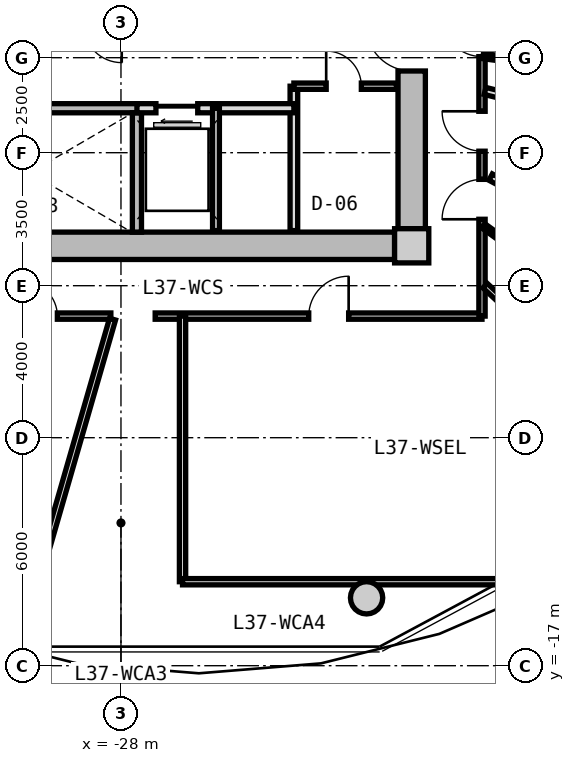
"""IFC4 building model, lengths in metres.
Left out: names, types, materials, properties, quantities, classifications, styles, units other than length and angle.
Written with IfcOpenShell. Run it as: python <this file> out.ifc"""

import sys

from ifc_helpers import new_model, si_unit, direction, frame, frame_2d, origin, origin_2d, place, context, subcontext, project, spatial, rectangle, circle, extrude, source, transform, mapped, element, fill, save


model = new_model("IFC4")
c1 = context("Model", 3, precision=1e-05, world=origin(), true_north=direction((0.0, 1.0)))
c2 = subcontext(c1, "Body", "Model", "MODEL_VIEW")
j1 = project(units=[si_unit("LENGTHUNIT", "METRE"), si_unit("PLANEANGLEUNIT", "RADIAN")], contexts=[c1])
p1 = place(None, origin())
s1 = spatial("IfcSite", under=j1, at=p1, CompositionType="ELEMENT")
p2 = place(p1, origin())
s2 = spatial("IfcBuilding", under=s1, at=p2, CompositionType="ELEMENT")
p3 = place(p2, frame((0.0, 0.0, 120.65)))
s3 = spatial("IfcBuildingStorey", under=s2, at=p3, CompositionType="ELEMENT", Elevation=120.65)
m1 = source(origin(), c2, "Body", "SweptSolid", [
    extrude(rectangle(XDim=0.9, YDim=0.9, at=origin_2d()), origin(), (0.0, 0.0, 1.0), 3.05),
])
p4 = place(p3, frame((-20.35, -5.95, 0.0), z_axis=(0.0, 0.0, 1.0), x_axis=(1.0, 0.0, 0.0)))
e1 = element("IfcColumn", 1, at=p4, inside=s3, PredefinedType="COLUMN", context=c2, shape_type="MappedRepresentation", body=[
    mapped(m1, transform((0.0, 0.0, 0.0), x_axis=(1.0, 0.0, 0.0), y_axis=(0.0, 1.0, 0.0), z_axis=(0.0, 0.0, 1.0), scale=1.0)),
])
m2 = source(origin(), c2, "Body", "SweptSolid", [
    extrude(rectangle(XDim=14.4, YDim=0.72, at=frame_2d((7.2, 0.0))), origin(), (0.0, 0.0, 1.0), 2.79),
])
p5 = place(p3, frame((-20.8, -5.95, 0.0), z_axis=(0.0, 0.0, 1.0), x_axis=(-1.0, 0.0, 0.0)))
e2 = element("IfcWall", 2, at=p5, inside=s3, PredefinedType="SHEAR", context=c2, shape_type="MappedRepresentation", body=[
    mapped(m2, transform((0.0, 0.0, 0.0), x_axis=(1.0, 0.0, 0.0), y_axis=(0.0, 1.0, 0.0), z_axis=(0.0, 0.0, 1.0), scale=1.0)),
])
m3 = source(origin(), c2, "Body", "SweptSolid", [
    extrude(rectangle(XDim=11.0, YDim=0.72, at=frame_2d((5.5, 0.0))), origin(), (0.0, 0.0, 1.0), 2.79),
])
p6 = place(p3, frame((-20.35, 5.5, 0.0), z_axis=(0.0, 0.0, 1.0), x_axis=(0.0, -1.0, 0.0)))
e3 = element("IfcWall", 3, at=p6, inside=s3, PredefinedType="SHEAR", context=c2, shape_type="MappedRepresentation", body=[
    mapped(m3, transform((0.0, 0.0, 0.0), x_axis=(1.0, 0.0, 0.0), y_axis=(0.0, 1.0, 0.0), z_axis=(0.0, 0.0, 1.0), scale=1.0)),
])
p7 = place(p6, frame((5.65, 0.0, 0.0)))
e4 = element("IfcOpeningElement", 4, at=p7, cuts=e3, PredefinedType="OPENING", context=c2, shape_type="SweptSolid", body=[
    extrude(rectangle(XDim=1.2, YDim=2.15, at=frame_2d((0.6, 1.075))), frame((0.0, 0.37, 0.0), z_axis=(0.0, -1.0, 0.0), x_axis=(1.0, 0.0, 0.0)), (0.0, 0.0, 1.0), 0.74),
])
m4 = source(origin(), c2, "Body", "SweptSolid", [
    extrude(circle(Radius=0.425, at=origin_2d()), origin(), (0.0, 0.0, 1.0), 3.05),
])
p8 = place(p3, frame((-21.537, -15.213, 0.0), z_axis=(0.0, 0.0, 1.0), x_axis=(1.0, 0.0, 0.0)))
e5 = element("IfcColumn", 5, at=p8, inside=s3, PredefinedType="COLUMN", context=c2, shape_type="MappedRepresentation", body=[
    mapped(m4, transform((0.0, 0.0, 0.0), x_axis=(1.0, 0.0, 0.0), y_axis=(0.0, 1.0, 0.0), z_axis=(0.0, 0.0, 1.0), scale=1.0)),
])
m5 = source(origin(), c2, "Body", "SweptSolid", [
    extrude(rectangle(XDim=7.83, YDim=0.24, at=frame_2d((3.915, 0.0))), origin(), (0.0, 0.0, 1.0), 2.79),
])
p9 = place(p3, frame((-35.29, -2.33, 0.0), z_axis=(0.0, 0.0, 1.0), x_axis=(1.0, 0.0, 0.0)))
e6 = element("IfcWall", 6, at=p9, inside=s3, PredefinedType="PARTITIONING", context=c2, shape_type="MappedRepresentation", body=[
    mapped(m5, transform((0.0, 0.0, 0.0), x_axis=(1.0, 0.0, 0.0), y_axis=(0.0, 1.0, 0.0), z_axis=(0.0, 0.0, 1.0), scale=1.0)),
])
p10 = place(p9, frame((0.95, 0.0, 0.0)))
e7 = element("IfcOpeningElement", 7, at=p10, cuts=e6, PredefinedType="OPENING", context=c2, shape_type="SweptSolid", body=[
    extrude(rectangle(XDim=1.1, YDim=2.15, at=frame_2d((0.55, 1.075))), frame((0.0, 0.13, 0.0), z_axis=(0.0, -1.0, 0.0), x_axis=(1.0, 0.0, 0.0)), (0.0, 0.0, 1.0), 0.26),
])
m6 = source(origin(), c2, "Body", "SweptSolid", [
    extrude(rectangle(XDim=3.14, YDim=0.24, at=frame_2d((1.57, 0.0))), origin(), (0.0, 0.0, 1.0), 2.79),
])
p11 = place(p3, frame((-27.58, -5.59, 0.0), z_axis=(0.0, 0.0, 1.0), x_axis=(0.0, 1.0, 0.0)))
e8 = element("IfcWall", 8, at=p11, inside=s3, PredefinedType="PARTITIONING", context=c2, shape_type="MappedRepresentation", body=[
    mapped(m6, transform((0.0, 0.0, 0.0), x_axis=(1.0, 0.0, 0.0), y_axis=(0.0, 1.0, 0.0), z_axis=(0.0, 0.0, 1.0), scale=1.0)),
])
m7 = source(origin(), c2, "Body", "SweptSolid", [
    extrude(rectangle(XDim=3.8, YDim=0.2, at=frame_2d((1.9, 0.0))), origin(), (0.0, 0.0, 1.0), 2.775),
])
p12 = place(p3, frame((-23.45, -5.55, 0.0), z_axis=(0.0, 0.0, 1.0), x_axis=(0.0, 1.0, 0.0)))
e9 = element("IfcWall", 9, at=p12, inside=s3, PredefinedType="PARTITIONING", context=c2, shape_type="MappedRepresentation", body=[
    mapped(m7, transform((0.0, 0.0, 0.0), x_axis=(1.0, 0.0, 0.0), y_axis=(0.0, 1.0, 0.0), z_axis=(0.0, 0.0, 1.0), scale=1.0)),
])
m8 = source(origin(), c2, "Body", "SweptSolid", [
    extrude(rectangle(XDim=4.13, YDim=0.24, at=frame_2d((2.065, 0.0))), origin(), (0.0, 0.0, 1.0), 2.775),
])
p13 = place(p3, frame((-27.58, -2.33, 0.0), z_axis=(0.0, 0.0, 1.0), x_axis=(1.0, 0.0, 0.0)))
e10 = element("IfcWall", 10, at=p13, inside=s3, PredefinedType="PARTITIONING", context=c2, shape_type="MappedRepresentation", body=[
    mapped(m8, transform((0.0, 0.0, 0.0), x_axis=(1.0, 0.0, 0.0), y_axis=(0.0, 1.0, 0.0), z_axis=(0.0, 0.0, 1.0), scale=1.0)),
])
p14 = place(p13, frame((0.5, 0.0, 0.0)))
e11 = element("IfcOpeningElement", 11, at=p14, cuts=e10, PredefinedType="OPENING", context=c2, shape_type="SweptSolid", body=[
    extrude(rectangle(XDim=1.1, YDim=2.2, at=frame_2d((0.55, 1.1))), frame((0.0, 0.13, 0.0), z_axis=(0.0, -1.0, 0.0), x_axis=(1.0, 0.0, 0.0)), (0.0, 0.0, 1.0), 0.26),
])
m9 = source(origin(), c2, "Body", "SweptSolid", [
    extrude(rectangle(XDim=3.22, YDim=0.18, at=frame_2d((1.61, 0.0))), origin(), (0.0, 0.0, 1.0), 2.775),
])
p15 = place(p3, frame((-25.5, -5.55, 0.0), z_axis=(0.0, 0.0, 1.0), x_axis=(0.0, 1.0, 0.0)))
e12 = element("IfcWall", 12, at=p15, inside=s3, PredefinedType="PARTITIONING", context=c2, shape_type="MappedRepresentation", body=[
    mapped(m9, transform((0.0, 0.0, 0.0), x_axis=(1.0, 0.0, 0.0), y_axis=(0.0, 1.0, 0.0), z_axis=(0.0, 0.0, 1.0), scale=1.0)),
])
m10 = source(origin(), c2, "Body", "SweptSolid", [
    extrude(rectangle(XDim=2.7, YDim=0.165, at=frame_2d((1.35, 0.0))), origin(), (0.0, 0.0, 1.0), 2.775),
])
p16 = place(p3, frame((-23.45, -1.75, 0.0), z_axis=(0.0, 0.0, 1.0), x_axis=(1.0, 0.0, 0.0)))
e13 = element("IfcWall", 13, at=p16, inside=s3, PredefinedType="PARTITIONING", context=c2, shape_type="MappedRepresentation", body=[
    mapped(m10, transform((0.0, 0.0, 0.0), x_axis=(1.0, 0.0, 0.0), y_axis=(0.0, 1.0, 0.0), z_axis=(0.0, 0.0, 1.0), scale=1.0)),
])
p17 = place(p16, frame((0.85, 0.0, 0.0)))
e14 = element("IfcOpeningElement", 14, at=p17, cuts=e13, PredefinedType="OPENING", context=c2, shape_type="SweptSolid", body=[
    extrude(rectangle(XDim=0.925, YDim=2.1, at=frame_2d((0.462, 1.05))), frame((0.0, 0.093, 0.0), z_axis=(0.0, -1.0, 0.0), x_axis=(1.0, 0.0, 0.0)), (0.0, 0.0, 1.0), 0.185),
])
m11 = source(origin(), c2, "Body", "SweptSolid", [
    extrude(rectangle(XDim=8.6, YDim=0.165, at=frame_2d((4.3, 0.0))), origin(), (0.0, 0.0, 1.0), 2.775),
])
p18 = place(p3, frame((-18.5, -7.8, 0.0), z_axis=(0.0, 0.0, 1.0), x_axis=(-1.0, 0.0, 0.0)))
e15 = element("IfcWall", 15, at=p18, inside=s3, PredefinedType="PARTITIONING", context=c2, shape_type="MappedRepresentation", body=[
    mapped(m11, transform((0.0, 0.0, 0.0), x_axis=(1.0, 0.0, 0.0), y_axis=(0.0, 1.0, 0.0), z_axis=(0.0, 0.0, 1.0), scale=1.0)),
])
p19 = place(p18, frame((3.509, 0.0, 0.0)))
e16 = element("IfcOpeningElement", 16, at=p19, cuts=e15, PredefinedType="OPENING", context=c2, shape_type="SweptSolid", body=[
    extrude(rectangle(XDim=1.05, YDim=2.15, at=frame_2d((0.525, 1.075))), frame((0.0, 0.093, 0.0), z_axis=(0.0, -1.0, 0.0), x_axis=(1.0, 0.0, 0.0)), (0.0, 0.0, 1.0), 0.185),
])
m12 = source(origin(), c2, "Body", "SweptSolid", [
    extrude(rectangle(XDim=9.234, YDim=0.165, at=frame_2d((4.617, 0.0))), origin(), (0.0, 0.0, 1.0), 2.775),
])
p20 = place(p3, frame((-28.266, -7.8, 0.0), z_axis=(0.0, 0.0, 1.0), x_axis=(-1.0, 0.0, 0.0)))
e17 = element("IfcWall", 17, at=p20, inside=s3, PredefinedType="PARTITIONING", context=c2, shape_type="MappedRepresentation", body=[
    mapped(m12, transform((0.0, 0.0, 0.0), x_axis=(1.0, 0.0, 0.0), y_axis=(0.0, 1.0, 0.0), z_axis=(0.0, 0.0, 1.0), scale=1.0)),
])
p21 = place(p20, frame((7.009, 0.0, 0.0)))
e18 = element("IfcOpeningElement", 18, at=p21, cuts=e17, PredefinedType="OPENING", context=c2, shape_type="SweptSolid", body=[
    extrude(rectangle(XDim=1.05, YDim=2.15, at=frame_2d((0.525, 1.075))), frame((0.0, 0.093, 0.0), z_axis=(0.0, -1.0, 0.0), x_axis=(1.0, 0.0, 0.0)), (0.0, 0.0, 1.0), 0.185),
])
p22 = place(p20, frame((4.392, 0.0, 0.0)))
e19 = element("IfcOpeningElement", 19, at=p22, cuts=e17, PredefinedType="OPENING", context=c2, shape_type="SweptSolid", body=[
    extrude(rectangle(XDim=0.92, YDim=2.1, at=frame_2d((0.46, 1.05))), frame((0.0, 0.093, 0.0), z_axis=(0.0, -1.0, 0.0), x_axis=(1.0, 0.0, 0.0)), (0.0, 0.0, 1.0), 0.185),
])
p23 = place(p20, frame((1.408, 0.0, 0.0)))
e20 = element("IfcOpeningElement", 20, at=p23, cuts=e17, PredefinedType="OPENING", context=c2, shape_type="SweptSolid", body=[
    extrude(rectangle(XDim=0.92, YDim=2.1, at=frame_2d((0.46, 1.05))), frame((0.0, 0.093, 0.0), z_axis=(0.0, -1.0, 0.0), x_axis=(1.0, 0.0, 0.0)), (0.0, 0.0, 1.0), 0.185),
])
m13 = source(origin(), c2, "Body", "SweptSolid", [
    extrude(rectangle(XDim=15.6, YDim=0.165, at=frame_2d((7.8, 0.0))), origin(), (0.0, 0.0, 1.0), 2.775),
])
p24 = place(p3, frame((-18.5, 7.8, 0.0), z_axis=(0.0, 0.0, 1.0), x_axis=(0.0, -1.0, 0.0)))
e21 = element("IfcWall", 21, at=p24, inside=s3, PredefinedType="PARTITIONING", context=c2, shape_type="MappedRepresentation", body=[
    mapped(m13, transform((0.0, 0.0, 0.0), x_axis=(1.0, 0.0, 0.0), y_axis=(0.0, 1.0, 0.0), z_axis=(0.0, 0.0, 1.0), scale=1.0)),
])
p25 = place(p24, frame((12.002, 0.0, 0.0)))
e22 = element("IfcOpeningElement", 22, at=p25, cuts=e21, PredefinedType="OPENING", context=c2, shape_type="SweptSolid", body=[
    extrude(rectangle(XDim=1.05, YDim=2.15, at=frame_2d((0.525, 1.075))), frame((0.0, 0.093, 0.0), z_axis=(0.0, -1.0, 0.0), x_axis=(1.0, 0.0, 0.0)), (0.0, 0.0, 1.0), 0.185),
])
p26 = place(p24, frame((10.211, 0.0, 0.0)))
e23 = element("IfcOpeningElement", 23, at=p26, cuts=e21, PredefinedType="OPENING", context=c2, shape_type="SweptSolid", body=[
    extrude(rectangle(XDim=1.05, YDim=2.15, at=frame_2d((0.525, 1.075))), frame((0.0, 0.093, 0.0), z_axis=(0.0, -1.0, 0.0), x_axis=(1.0, 0.0, 0.0)), (0.0, 0.0, 1.0), 0.185),
])
p27 = place(p24, frame((7.722, 0.0, 0.0)))
e24 = element("IfcOpeningElement", 24, at=p27, cuts=e21, PredefinedType="OPENING", context=c2, shape_type="SweptSolid", body=[
    extrude(rectangle(XDim=1.05, YDim=2.15, at=frame_2d((0.525, 1.075))), frame((0.0, 0.093, 0.0), z_axis=(0.0, -1.0, 0.0), x_axis=(1.0, 0.0, 0.0)), (0.0, 0.0, 1.0), 0.185),
])
p28 = place(p24, frame((6.291, 0.0, 0.0)))
e25 = element("IfcOpeningElement", 25, at=p28, cuts=e21, PredefinedType="OPENING", context=c2, shape_type="SweptSolid", body=[
    extrude(rectangle(XDim=1.05, YDim=2.15, at=frame_2d((0.525, 1.075))), frame((0.0, 0.093, 0.0), z_axis=(0.0, -1.0, 0.0), x_axis=(1.0, 0.0, 0.0)), (0.0, 0.0, 1.0), 0.185),
])
p29 = place(p24, frame((4.296, 0.0, 0.0)))
e26 = element("IfcOpeningElement", 26, at=p29, cuts=e21, PredefinedType="OPENING", context=c2, shape_type="SweptSolid", body=[
    extrude(rectangle(XDim=1.05, YDim=2.15, at=frame_2d((0.525, 1.075))), frame((0.0, 0.093, 0.0), z_axis=(0.0, -1.0, 0.0), x_axis=(1.0, 0.0, 0.0)), (0.0, 0.0, 1.0), 0.185),
])
p30 = place(p24, frame((1.654, 0.0, 0.0)))
e27 = element("IfcOpeningElement", 27, at=p30, cuts=e21, PredefinedType="OPENING", context=c2, shape_type="SweptSolid", body=[
    extrude(rectangle(XDim=1.05, YDim=2.15, at=frame_2d((0.525, 1.075))), frame((0.0, 0.093, 0.0), z_axis=(0.0, -1.0, 0.0), x_axis=(1.0, 0.0, 0.0)), (0.0, 0.0, 1.0), 0.185),
])
m14 = source(origin(), c2, "Body", "SweptSolid", [
    extrude(rectangle(XDim=8.989, YDim=0.165, at=frame_2d((4.495, 0.0))), origin(), (0.0, 0.0, 1.0), 2.275),
])
p31 = place(p3, frame((-28.222, -7.88, 0.0), z_axis=(0.0, 0.0, 1.0), x_axis=(-0.27702323008, -0.960863221274, 0.0)))
e28 = element("IfcWall", 28, at=p31, inside=s3, PredefinedType="PARTITIONING", context=c2, shape_type="MappedRepresentation", body=[
    mapped(m14, transform((0.0, 0.0, 0.0), x_axis=(1.0, 0.0, 0.0), y_axis=(0.0, 1.0, 0.0), z_axis=(0.0, 0.0, 1.0), scale=1.0)),
])
m15 = source(origin(), c2, "Body", "SweptSolid", [
    extrude(rectangle(XDim=7.482, YDim=0.165, at=frame_2d((3.741, 0.0))), origin(), (0.0, 0.0, 1.0), 2.275),
])
p32 = place(p3, frame((-18.42, -6.998, 0.0), z_axis=(0.0, 0.0, 1.0), x_axis=(0.732508698043, -0.680757671489, 0.0)))
e29 = element("IfcWall", 29, at=p32, inside=s3, PredefinedType="PARTITIONING", context=c2, shape_type="MappedRepresentation", body=[
    mapped(m15, transform((0.0, 0.0, 0.0), x_axis=(1.0, 0.0, 0.0), y_axis=(0.0, 1.0, 0.0), z_axis=(0.0, 0.0, 1.0), scale=1.0)),
])
m16 = source(origin(), c2, "Body", "SweptSolid", [
    extrude(rectangle(XDim=6.99, YDim=0.165, at=frame_2d((3.495, 0.0))), origin(), (0.0, 0.0, 1.0), 2.775),
])
p33 = place(p3, frame((-26.38, -14.79, 0.0), z_axis=(0.0, 0.0, 1.0), x_axis=(0.0, 1.0, 0.0)))
e30 = element("IfcWall", 30, at=p33, inside=s3, PredefinedType="PARTITIONING", context=c2, shape_type="MappedRepresentation", body=[
    mapped(m16, transform((0.0, 0.0, 0.0), x_axis=(1.0, 0.0, 0.0), y_axis=(0.0, 1.0, 0.0), z_axis=(0.0, 0.0, 1.0), scale=1.0)),
])
m17 = source(origin(), c2, "Body", "SweptSolid", [
    extrude(rectangle(XDim=8.669, YDim=0.165, at=frame_2d((4.335, 0.0))), origin(), (0.0, 0.0, 1.0), 2.775),
])
p34 = place(p3, frame((-26.38, -14.79, 0.0), z_axis=(0.0, 0.0, 1.0), x_axis=(1.0, 0.0, 0.0)))
e31 = element("IfcWall", 31, at=p34, inside=s3, PredefinedType="PARTITIONING", context=c2, shape_type="MappedRepresentation", body=[
    mapped(m17, transform((0.0, 0.0, 0.0), x_axis=(1.0, 0.0, 0.0), y_axis=(0.0, 1.0, 0.0), z_axis=(0.0, 0.0, 1.0), scale=1.0)),
])
m18 = source(origin(), c2, "Body", "SweptSolid", [
    extrude(rectangle(XDim=10.556, YDim=0.19, at=frame_2d((5.278, 0.0))), origin(), (0.0, 0.0, 1.0), 2.275),
])
p35 = place(p3, frame((-18.42, -1.875, 0.0), z_axis=(0.0, 0.0, 1.0), x_axis=(0.970363857851, -0.241648470667, 0.0)))
e32 = element("IfcWall", 32, at=p35, inside=s3, PredefinedType="PARTITIONING", context=c2, shape_type="MappedRepresentation", body=[
    mapped(m18, transform((0.0, 0.0, 0.0), x_axis=(1.0, 0.0, 0.0), y_axis=(0.0, 1.0, 0.0), z_axis=(0.0, 0.0, 1.0), scale=1.0)),
])
m19 = source(origin(), c2, "Body", "SweptSolid", [
    extrude(rectangle(XDim=8.744, YDim=0.19, at=frame_2d((4.372, 0.0))), origin(), (0.0, 0.0, 1.0), 2.775),
])
p36 = place(p3, frame((-18.273, -4.142, 0.0), z_axis=(0.0, 0.0, 1.0), x_axis=(0.882252449936, -0.470776607938, 0.0)))
e33 = element("IfcWall", 33, at=p36, inside=s3, PredefinedType="PARTITIONING", context=c2, shape_type="MappedRepresentation", body=[
    mapped(m19, transform((0.0, 0.0, 0.0), x_axis=(1.0, 0.0, 0.0), y_axis=(0.0, 1.0, 0.0), z_axis=(0.0, 0.0, 1.0), scale=1.0)),
])
m20 = source(origin(), c2, "Body", "SweptSolid", [
    extrude(rectangle(XDim=3.621, YDim=0.14, at=frame_2d((1.811, 0.0))), origin(), (0.0, 0.0, 1.0), 2.775),
])
p37 = place(p3, frame((-18.47, -5.422, 0.0), z_axis=(0.0, 0.0, 1.0), x_axis=(0.80968252222, -0.586868139544, 0.0)))
e34 = element("IfcWall", 34, at=p37, inside=s3, PredefinedType="PARTITIONING", context=c2, shape_type="MappedRepresentation", body=[
    mapped(m20, transform((0.0, 0.0, 0.0), x_axis=(1.0, 0.0, 0.0), y_axis=(0.0, 1.0, 0.0), z_axis=(0.0, 0.0, 1.0), scale=1.0)),
])
p38 = place(p37, frame((1.351, 0.0, 0.0)))
e35 = element("IfcOpeningElement", 35, at=p38, cuts=e34, PredefinedType="OPENING", context=c2, shape_type="SweptSolid", body=[
    extrude(rectangle(XDim=0.92, YDim=2.1, at=frame_2d((0.46, 1.05))), frame((0.0, 0.08, 0.0), z_axis=(0.0, -1.0, 0.0), x_axis=(1.0, 0.0, 0.0)), (0.0, 0.0, 1.0), 0.16),
])
m21 = source(origin(), c2, "Body", "SweptSolid", [
    extrude(rectangle(XDim=4.562, YDim=0.14, at=frame_2d((2.281, 0.0))), origin(), (0.0, 0.0, 1.0), 2.775),
])
p39 = place(p3, frame((-18.47, -0.958, 0.0), z_axis=(0.0, 0.0, 1.0), x_axis=(0.991904666356, -0.126984774129, 0.0)))
e36 = element("IfcWall", 36, at=p39, inside=s3, PredefinedType="PARTITIONING", context=c2, shape_type="MappedRepresentation", body=[
    mapped(m21, transform((0.0, 0.0, 0.0), x_axis=(1.0, 0.0, 0.0), y_axis=(0.0, 1.0, 0.0), z_axis=(0.0, 0.0, 1.0), scale=1.0)),
])
p40 = place(p39, frame((1.821, 0.0, 0.0)))
e37 = element("IfcOpeningElement", 37, at=p40, cuts=e36, PredefinedType="OPENING", context=c2, shape_type="SweptSolid", body=[
    extrude(rectangle(XDim=0.92, YDim=2.1, at=frame_2d((0.46, 1.05))), frame((0.0, 0.08, 0.0), z_axis=(0.0, -1.0, 0.0), x_axis=(1.0, 0.0, 0.0)), (0.0, 0.0, 1.0), 0.16),
])
m22 = source(origin(), c2, "Body", "SweptSolid", [
    extrude(rectangle(XDim=1.2, YDim=2.15, at=frame_2d((0.6, 1.075))), frame((0.0, 0.025, 0.0), z_axis=(0.0, -1.0, 0.0), x_axis=(1.0, 0.0, 0.0)), (0.0, 0.0, 1.0), 0.05),
])
p41 = place(p7, frame((1.2, 0.0, 0.0), z_axis=(0.0, 0.0, 1.0), x_axis=(-1.0, 0.0, 0.0)))
e38 = element("IfcDoor", 38, at=p41, inside=s3, OperationType="SINGLE_SWING_RIGHT", PredefinedType="DOOR", context=c2, shape_type="MappedRepresentation", body=[
    mapped(m22, transform((0.0, 0.0, 0.0), x_axis=(1.0, 0.0, 0.0), y_axis=(0.0, 1.0, 0.0), z_axis=(0.0, 0.0, 1.0), scale=1.0)),
])
fill(e4, e38)
m23 = source(origin(), c2, "Body", "SweptSolid", [
    extrude(rectangle(XDim=1.1, YDim=2.2, at=frame_2d((0.55, 1.1))), frame((0.0, 0.025, 0.0), z_axis=(0.0, -1.0, 0.0), x_axis=(1.0, 0.0, 0.0)), (0.0, 0.0, 1.0), 0.05),
])
p42 = place(p14, frame((1.1, 0.0, 0.0), z_axis=(0.0, 0.0, 1.0), x_axis=(-1.0, 0.0, 0.0)))
e39 = element("IfcDoor", 39, at=p42, inside=s3, OperationType="SLIDING_TO_LEFT", PredefinedType="DOOR", context=c2, shape_type="MappedRepresentation", body=[
    mapped(m23, transform((0.0, 0.0, 0.0), x_axis=(1.0, 0.0, 0.0), y_axis=(0.0, 1.0, 0.0), z_axis=(0.0, 0.0, 1.0), scale=1.0)),
])
fill(e11, e39)
m24 = source(origin(), c2, "Body", "SweptSolid", [
    extrude(rectangle(XDim=0.925, YDim=2.1, at=frame_2d((0.462, 1.05))), frame((0.0, 0.025, 0.0), z_axis=(0.0, -1.0, 0.0), x_axis=(1.0, 0.0, 0.0)), (0.0, 0.0, 1.0), 0.05),
])
p43 = place(p17, origin())
e40 = element("IfcDoor", 40, at=p43, inside=s3, OperationType="SINGLE_SWING_LEFT", PredefinedType="DOOR", context=c2, shape_type="MappedRepresentation", body=[
    mapped(m24, transform((0.0, 0.0, 0.0), x_axis=(1.0, 0.0, 0.0), y_axis=(0.0, 1.0, 0.0), z_axis=(0.0, 0.0, 1.0), scale=1.0)),
])
fill(e14, e40)
m25 = source(origin(), c2, "Body", "SweptSolid", [
    extrude(rectangle(XDim=1.05, YDim=2.15, at=frame_2d((0.525, 1.075))), frame((0.0, 0.025, 0.0), z_axis=(0.0, -1.0, 0.0), x_axis=(1.0, 0.0, 0.0)), (0.0, 0.0, 1.0), 0.05),
])
p44 = place(p19, frame((1.05, 0.0, 0.0), z_axis=(0.0, 0.0, 1.0), x_axis=(-1.0, 0.0, 0.0)))
e41 = element("IfcDoor", 41, at=p44, inside=s3, OperationType="SINGLE_SWING_RIGHT", PredefinedType="DOOR", context=c2, shape_type="MappedRepresentation", body=[
    mapped(m25, transform((0.0, 0.0, 0.0), x_axis=(1.0, 0.0, 0.0), y_axis=(0.0, 1.0, 0.0), z_axis=(0.0, 0.0, 1.0), scale=1.0)),
])
fill(e16, e41)
m26 = source(origin(), c2, "Body", "SweptSolid", [
    extrude(rectangle(XDim=0.92, YDim=2.1, at=frame_2d((0.46, 1.05))), frame((0.0, 0.025, 0.0), z_axis=(0.0, -1.0, 0.0), x_axis=(1.0, 0.0, 0.0)), (0.0, 0.0, 1.0), 0.05),
])
p45 = place(p23, frame((0.92, 0.0, 0.0), z_axis=(0.0, 0.0, 1.0), x_axis=(-1.0, 0.0, 0.0)))
e42 = element("IfcDoor", 42, at=p45, inside=s3, OperationType="SINGLE_SWING_LEFT", PredefinedType="DOOR", context=c2, shape_type="MappedRepresentation", body=[
    mapped(m26, transform((0.0, 0.0, 0.0), x_axis=(1.0, 0.0, 0.0), y_axis=(0.0, 1.0, 0.0), z_axis=(0.0, 0.0, 1.0), scale=1.0)),
])
fill(e20, e42)
p46 = place(p25, frame((1.05, 0.0, 0.0), z_axis=(0.0, 0.0, 1.0), x_axis=(-1.0, 0.0, 0.0)))
e43 = element("IfcDoor", 43, at=p46, inside=s3, OperationType="SINGLE_SWING_LEFT", PredefinedType="DOOR", context=c2, shape_type="MappedRepresentation", body=[
    mapped(m25, transform((0.0, 0.0, 0.0), x_axis=(1.0, 0.0, 0.0), y_axis=(0.0, 1.0, 0.0), z_axis=(0.0, 0.0, 1.0), scale=1.0)),
])
fill(e22, e43)
p47 = place(p26, frame((1.05, 0.0, 0.0), z_axis=(0.0, 0.0, 1.0), x_axis=(-1.0, 0.0, 0.0)))
e44 = element("IfcDoor", 44, at=p47, inside=s3, OperationType="SINGLE_SWING_RIGHT", PredefinedType="DOOR", context=c2, shape_type="MappedRepresentation", body=[
    mapped(m25, transform((0.0, 0.0, 0.0), x_axis=(1.0, 0.0, 0.0), y_axis=(0.0, 1.0, 0.0), z_axis=(0.0, 0.0, 1.0), scale=1.0)),
])
fill(e23, e44)
p48 = place(p27, frame((1.05, 0.0, 0.0), z_axis=(0.0, 0.0, 1.0), x_axis=(-1.0, 0.0, 0.0)))
e45 = element("IfcDoor", 45, at=p48, inside=s3, OperationType="SINGLE_SWING_RIGHT", PredefinedType="DOOR", context=c2, shape_type="MappedRepresentation", body=[
    mapped(m25, transform((0.0, 0.0, 0.0), x_axis=(1.0, 0.0, 0.0), y_axis=(0.0, 1.0, 0.0), z_axis=(0.0, 0.0, 1.0), scale=1.0)),
])
fill(e24, e45)
save(model, sys.argv[1])
